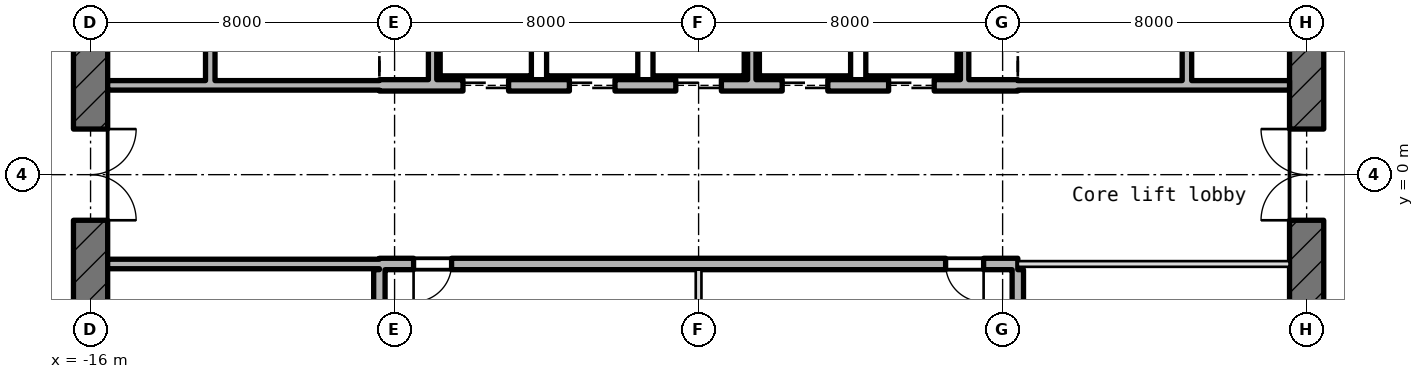
"""IFC4 building model, lengths in metres.
Left out: names, types, materials, properties, quantities, classifications, styles, units other than length and angle.
Written with IfcOpenShell. Run it as: python <this file> out.ifc"""

import sys

from ifc_helpers import new_model, si_unit, direction, frame, frame_2d, origin, place, context, subcontext, project, spatial, rectangle, extrude, element, fill, save


model = new_model("IFC4")
c1 = context("Model", 3, precision=1e-05, world=origin(), true_north=direction((0.0, 1.0)))
c2 = subcontext(c1, "Body", "Model", "MODEL_VIEW")
j1 = project(units=[si_unit("LENGTHUNIT", "METRE"), si_unit("PLANEANGLEUNIT", "RADIAN")], contexts=[c1])
p1 = place(None, origin())
s1 = spatial("IfcSite", under=j1, at=p1, CompositionType="ELEMENT")
p2 = place(p1, origin())
s2 = spatial("IfcBuilding", under=s1, at=p2, CompositionType="ELEMENT")
p3 = place(p2, frame((0.0, 0.0, 198.4)))
s3 = spatial("IfcBuildingStorey", under=s2, at=p3, CompositionType="ELEMENT", Elevation=198.4)
p4 = place(p3, frame((16.0, -10.186, -0.18), z_axis=(0.0, 0.0, 1.0), x_axis=(0.0, 1.0, 0.0)))
e1 = element("IfcWall", 1, at=p4, inside=s3, PredefinedType="SHEAR", context=c2, shape_type="SweptSolid", body=[
    extrude(rectangle(XDim=20.373, YDim=0.9, at=frame_2d((10.186, 0.0))), origin(), (0.0, 0.0, 1.0), 4.15),
])
p5 = place(p4, frame((8.986, 0.0, 0.18)))
e2 = element("IfcOpeningElement", 2, at=p5, cuts=e1, PredefinedType="OPENING", context=c2, shape_type="SweptSolid", body=[
    extrude(rectangle(XDim=2.4, YDim=2.1, at=frame_2d((1.2, 1.05))), frame((0.0, 0.46, 0.0), z_axis=(0.0, -1.0, 0.0), x_axis=(1.0, 0.0, 0.0)), (0.0, 0.0, 1.0), 0.92),
])
p6 = place(p4, frame((13.586, 0.0, 0.18)))
e3 = element("IfcOpeningElement", 3, at=p6, cuts=e1, PredefinedType="OPENING", context=c2, shape_type="SweptSolid", body=[
    extrude(rectangle(XDim=1.2, YDim=2.1, at=frame_2d((0.6, 1.05))), frame((0.0, 0.46, 0.0), z_axis=(0.0, -1.0, 0.0), x_axis=(1.0, 0.0, 0.0)), (0.0, 0.0, 1.0), 0.92),
])
p7 = place(p4, frame((3.586, 0.0, 0.18)))
e4 = element("IfcOpeningElement", 4, at=p7, cuts=e1, PredefinedType="OPENING", context=c2, shape_type="SweptSolid", body=[
    extrude(rectangle(XDim=1.2, YDim=2.1, at=frame_2d((0.6, 1.05))), frame((0.0, 0.46, 0.0), z_axis=(0.0, -1.0, 0.0), x_axis=(1.0, 0.0, 0.0)), (0.0, 0.0, 1.0), 0.92),
])
p8 = place(p3, frame((-16.0, 10.186, -0.18), z_axis=(0.0, 0.0, 1.0), x_axis=(0.0, -1.0, 0.0)))
e5 = element("IfcWall", 5, at=p8, inside=s3, PredefinedType="SHEAR", context=c2, shape_type="SweptSolid", body=[
    extrude(rectangle(XDim=20.373, YDim=0.9, at=frame_2d((10.186, 0.0))), origin(), (0.0, 0.0, 1.0), 4.15),
])
p9 = place(p8, frame((8.986, 0.0, 0.18)))
e6 = element("IfcOpeningElement", 6, at=p9, cuts=e5, PredefinedType="OPENING", context=c2, shape_type="SweptSolid", body=[
    extrude(rectangle(XDim=2.4, YDim=2.1, at=frame_2d((1.2, 1.05))), frame((0.0, 0.46, 0.0), z_axis=(0.0, -1.0, 0.0), x_axis=(1.0, 0.0, 0.0)), (0.0, 0.0, 1.0), 0.92),
])
p10 = place(p8, frame((5.586, 0.0, 0.18)))
e7 = element("IfcOpeningElement", 7, at=p10, cuts=e5, PredefinedType="OPENING", context=c2, shape_type="SweptSolid", body=[
    extrude(rectangle(XDim=1.2, YDim=2.1, at=frame_2d((0.6, 1.05))), frame((0.0, 0.46, 0.0), z_axis=(0.0, -1.0, 0.0), x_axis=(1.0, 0.0, 0.0)), (0.0, 0.0, 1.0), 0.92),
])
p11 = place(p3, frame((-15.55, -2.35, 0.0), z_axis=(0.0, 0.0, 1.0), x_axis=(1.0, 0.0, 0.0)))
e8 = element("IfcWall", 8, at=p11, inside=s3, PredefinedType="STANDARD", context=c2, shape_type="SweptSolid", body=[
    extrude(rectangle(XDim=7.15, YDim=0.25, at=frame_2d((3.575, 0.0))), origin(), (0.0, 0.0, 1.0), 3.97),
])
p12 = place(p3, frame((-8.4, -2.35, -0.18), z_axis=(0.0, 0.0, 1.0), x_axis=(1.0, 0.0, 0.0)))
e9 = element("IfcWall", 9, at=p12, inside=s3, PredefinedType="SHEAR", context=c2, shape_type="SweptSolid", body=[
    extrude(rectangle(XDim=16.8, YDim=0.3, at=frame_2d((8.4, 0.0))), origin(), (0.0, 0.0, 1.0), 4.15),
])
p13 = place(p12, frame((0.9, 0.0, 0.18)))
e10 = element("IfcOpeningElement", 10, at=p13, cuts=e9, PredefinedType="OPENING", context=c2, shape_type="SweptSolid", body=[
    extrude(rectangle(XDim=1.0, YDim=2.1, at=frame_2d((0.5, 1.05))), frame((0.0, 0.16, 0.0), z_axis=(0.0, -1.0, 0.0), x_axis=(1.0, 0.0, 0.0)), (0.0, 0.0, 1.0), 0.32),
])
p14 = place(p12, frame((14.9, 0.0, 0.18)))
e11 = element("IfcOpeningElement", 11, at=p14, cuts=e9, PredefinedType="OPENING", context=c2, shape_type="SweptSolid", body=[
    extrude(rectangle(XDim=1.0, YDim=2.1, at=frame_2d((0.5, 1.05))), frame((0.0, 0.16, 0.0), z_axis=(0.0, -1.0, 0.0), x_axis=(1.0, 0.0, 0.0)), (0.0, 0.0, 1.0), 0.32),
])
p15 = place(p3, frame((8.4, -2.35, 0.0), z_axis=(0.0, 0.0, 1.0), x_axis=(1.0, 0.0, 0.0)))
e12 = element("IfcWall", 12, at=p15, inside=s3, PredefinedType="PARTITIONING", context=c2, shape_type="SweptSolid", body=[
    extrude(rectangle(XDim=7.15, YDim=0.15, at=frame_2d((3.575, 0.0))), origin(), (0.0, 0.0, 1.0), 3.97),
])
p16 = place(p3, frame((-15.55, 2.35, 0.0), z_axis=(0.0, 0.0, 1.0), x_axis=(1.0, 0.0, 0.0)))
e13 = element("IfcWall", 13, at=p16, inside=s3, PredefinedType="STANDARD", context=c2, shape_type="SweptSolid", body=[
    extrude(rectangle(XDim=7.15, YDim=0.25, at=frame_2d((3.575, 0.0))), origin(), (0.0, 0.0, 1.0), 3.97),
])
p17 = place(p3, frame((-8.4, 2.35, -0.18), z_axis=(0.0, 0.0, 1.0), x_axis=(1.0, 0.0, 0.0)))
e14 = element("IfcWall", 14, at=p17, inside=s3, PredefinedType="SHEAR", context=c2, shape_type="SweptSolid", body=[
    extrude(rectangle(XDim=16.8, YDim=0.3, at=frame_2d((8.4, 0.0))), origin(), (0.0, 0.0, 1.0), 4.15),
])
p18 = place(p17, frame((2.2, 0.0, 0.18)))
e15 = element("IfcOpeningElement", 15, at=p18, cuts=e14, PredefinedType="OPENING", context=c2, shape_type="SweptSolid", body=[
    extrude(rectangle(XDim=1.2, YDim=2.1, at=frame_2d((0.6, 1.05))), frame((0.0, 0.16, 0.0), z_axis=(0.0, -1.0, 0.0), x_axis=(1.0, 0.0, 0.0)), (0.0, 0.0, 1.0), 0.32),
])
p19 = place(p17, frame((5.0, 0.0, 0.18)))
e16 = element("IfcOpeningElement", 16, at=p19, cuts=e14, PredefinedType="OPENING", context=c2, shape_type="SweptSolid", body=[
    extrude(rectangle(XDim=1.2, YDim=2.1, at=frame_2d((0.6, 1.05))), frame((0.0, 0.16, 0.0), z_axis=(0.0, -1.0, 0.0), x_axis=(1.0, 0.0, 0.0)), (0.0, 0.0, 1.0), 0.32),
])
p20 = place(p17, frame((7.8, 0.0, 0.18)))
e17 = element("IfcOpeningElement", 17, at=p20, cuts=e14, PredefinedType="OPENING", context=c2, shape_type="SweptSolid", body=[
    extrude(rectangle(XDim=1.2, YDim=2.1, at=frame_2d((0.6, 1.05))), frame((0.0, 0.16, 0.0), z_axis=(0.0, -1.0, 0.0), x_axis=(1.0, 0.0, 0.0)), (0.0, 0.0, 1.0), 0.32),
])
p21 = place(p17, frame((10.6, 0.0, 0.18)))
e18 = element("IfcOpeningElement", 18, at=p21, cuts=e14, PredefinedType="OPENING", context=c2, shape_type="SweptSolid", body=[
    extrude(rectangle(XDim=1.2, YDim=2.1, at=frame_2d((0.6, 1.05))), frame((0.0, 0.16, 0.0), z_axis=(0.0, -1.0, 0.0), x_axis=(1.0, 0.0, 0.0)), (0.0, 0.0, 1.0), 0.32),
])
p22 = place(p17, frame((13.4, 0.0, 0.18)))
e19 = element("IfcOpeningElement", 19, at=p22, cuts=e14, PredefinedType="OPENING", context=c2, shape_type="SweptSolid", body=[
    extrude(rectangle(XDim=1.2, YDim=2.1, at=frame_2d((0.6, 1.05))), frame((0.0, 0.16, 0.0), z_axis=(0.0, -1.0, 0.0), x_axis=(1.0, 0.0, 0.0)), (0.0, 0.0, 1.0), 0.32),
])
p23 = place(p3, frame((8.4, 2.35, 0.0), z_axis=(0.0, 0.0, 1.0), x_axis=(1.0, 0.0, 0.0)))
e20 = element("IfcWall", 20, at=p23, inside=s3, PredefinedType="STANDARD", context=c2, shape_type="SweptSolid", body=[
    extrude(rectangle(XDim=7.15, YDim=0.25, at=frame_2d((3.575, 0.0))), origin(), (0.0, 0.0, 1.0), 3.97),
])
p24 = place(p3, frame((-12.85, 2.475, 0.0), z_axis=(0.0, 0.0, 1.0), x_axis=(0.0, 1.0, 0.0)))
e21 = element("IfcWall", 21, at=p24, inside=s3, PredefinedType="STANDARD", context=c2, shape_type="SweptSolid", body=[
    extrude(rectangle(XDim=3.05, YDim=0.25, at=frame_2d((1.525, 0.0))), origin(), (0.0, 0.0, 1.0), 3.97),
])
p25 = place(p3, frame((-8.4, -8.75, -0.18), z_axis=(0.0, 0.0, 1.0), x_axis=(0.0, 1.0, 0.0)))
e22 = element("IfcWall", 22, at=p25, inside=s3, PredefinedType="SHEAR", context=c2, shape_type="SweptSolid", body=[
    extrude(rectangle(XDim=6.25, YDim=0.3, at=frame_2d((3.125, 0.0))), origin(), (0.0, 0.0, 1.0), 4.15),
])
p26 = place(p3, frame((-7.0, 2.5, 0.0), z_axis=(0.0, 0.0, 1.0), x_axis=(0.0, 1.0, 0.0)))
e23 = element("IfcWall", 23, at=p26, inside=s3, PredefinedType="STANDARD", context=c2, shape_type="SweptSolid", body=[
    extrude(rectangle(XDim=2.74, YDim=0.22, at=frame_2d((1.37, 0.0))), origin(), (0.0, 0.0, 1.0), 3.97),
])
p27 = place(p3, frame((0.0, -5.24, 0.0), z_axis=(0.0, 0.0, 1.0), x_axis=(0.0, 1.0, 0.0)))
e24 = element("IfcWall", 24, at=p27, inside=s3, PredefinedType="PARTITIONING", context=c2, shape_type="SweptSolid", body=[
    extrude(rectangle(XDim=2.74, YDim=0.15, at=frame_2d((1.37, 0.0))), origin(), (0.0, 0.0, 1.0), 3.97),
])
for number, where, z_axis, x_axis in (
    (25, (1.4, 2.5, 0.0), (0.0, 0.0, 1.0), (0.0, 1.0, 0.0)),
    (26, (7.0, 2.5, 0.0), (0.0, 0.0, 1.0), (0.0, 1.0, 0.0)),
):
    element("IfcWall", number, at=place(p3, frame(where, z_axis=z_axis, x_axis=x_axis)), inside=s3, PredefinedType="STANDARD", context=c2, shape_type="SweptSolid", body=[
        extrude(rectangle(XDim=2.74, YDim=0.22, at=frame_2d((1.37, 0.0))), origin(), (0.0, 0.0, 1.0), 3.97),
    ])
p28 = place(p3, frame((8.4, -8.35, -0.18), z_axis=(0.0, 0.0, 1.0), x_axis=(0.0, 1.0, 0.0)))
e27 = element("IfcWall", 27, at=p28, inside=s3, PredefinedType="SHEAR", context=c2, shape_type="SweptSolid", body=[
    extrude(rectangle(XDim=5.85, YDim=0.3, at=frame_2d((2.925, 0.0))), origin(), (0.0, 0.0, 1.0), 4.15),
])
p29 = place(p3, frame((12.85, 2.475, 0.0), z_axis=(0.0, 0.0, 1.0), x_axis=(0.0, 1.0, 0.0)))
e28 = element("IfcWall", 28, at=p29, inside=s3, PredefinedType="STANDARD", context=c2, shape_type="SweptSolid", body=[
    extrude(rectangle(XDim=3.05, YDim=0.25, at=frame_2d((1.525, 0.0))), origin(), (0.0, 0.0, 1.0), 3.97),
])
p30 = place(p18, origin())
e29 = element("IfcDoor", 29, at=p30, inside=s3, OperationType="DOUBLE_DOOR_SLIDING", PredefinedType="DOOR", context=c2, shape_type="SweptSolid", body=[
    extrude(rectangle(XDim=1.2, YDim=2.1, at=frame_2d((0.6, 1.05))), frame((0.0, 0.025, 0.0), z_axis=(0.0, -1.0, 0.0), x_axis=(1.0, 0.0, 0.0)), (0.0, 0.0, 1.0), 0.05),
])
fill(e15, e29)
p31 = place(p19, origin())
e30 = element("IfcDoor", 30, at=p31, inside=s3, OperationType="DOUBLE_DOOR_SLIDING", PredefinedType="DOOR", context=c2, shape_type="SweptSolid", body=[
    extrude(rectangle(XDim=1.2, YDim=2.1, at=frame_2d((0.6, 1.05))), frame((0.0, 0.025, 0.0), z_axis=(0.0, -1.0, 0.0), x_axis=(1.0, 0.0, 0.0)), (0.0, 0.0, 1.0), 0.05),
])
fill(e16, e30)
p32 = place(p20, origin())
e31 = element("IfcDoor", 31, at=p32, inside=s3, OperationType="DOUBLE_DOOR_SLIDING", PredefinedType="DOOR", context=c2, shape_type="SweptSolid", body=[
    extrude(rectangle(XDim=1.2, YDim=2.1, at=frame_2d((0.6, 1.05))), frame((0.0, 0.025, 0.0), z_axis=(0.0, -1.0, 0.0), x_axis=(1.0, 0.0, 0.0)), (0.0, 0.0, 1.0), 0.05),
])
fill(e17, e31)
p33 = place(p21, origin())
e32 = element("IfcDoor", 32, at=p33, inside=s3, OperationType="DOUBLE_DOOR_SLIDING", PredefinedType="DOOR", context=c2, shape_type="SweptSolid", body=[
    extrude(rectangle(XDim=1.2, YDim=2.1, at=frame_2d((0.6, 1.05))), frame((0.0, 0.025, 0.0), z_axis=(0.0, -1.0, 0.0), x_axis=(1.0, 0.0, 0.0)), (0.0, 0.0, 1.0), 0.05),
])
fill(e18, e32)
p34 = place(p22, origin())
e33 = element("IfcDoor", 33, at=p34, inside=s3, OperationType="DOUBLE_DOOR_SLIDING", PredefinedType="DOOR", context=c2, shape_type="SweptSolid", body=[
    extrude(rectangle(XDim=1.2, YDim=2.1, at=frame_2d((0.6, 1.05))), frame((0.0, 0.025, 0.0), z_axis=(0.0, -1.0, 0.0), x_axis=(1.0, 0.0, 0.0)), (0.0, 0.0, 1.0), 0.05),
])
fill(e19, e33)
p35 = place(p9, origin())
e34 = element("IfcDoor", 34, at=p35, inside=s3, OperationType="DOUBLE_DOOR_SINGLE_SWING", PredefinedType="DOOR", context=c2, shape_type="SweptSolid", body=[
    extrude(rectangle(XDim=2.4, YDim=2.1, at=frame_2d((1.2, 1.05))), frame((0.0, 0.025, 0.0), z_axis=(0.0, -1.0, 0.0), x_axis=(1.0, 0.0, 0.0)), (0.0, 0.0, 1.0), 0.05),
])
fill(e6, e34)
p36 = place(p5, origin())
e35 = element("IfcDoor", 35, at=p36, inside=s3, OperationType="DOUBLE_DOOR_SINGLE_SWING", PredefinedType="DOOR", context=c2, shape_type="SweptSolid", body=[
    extrude(rectangle(XDim=2.4, YDim=2.1, at=frame_2d((1.2, 1.05))), frame((0.0, 0.025, 0.0), z_axis=(0.0, -1.0, 0.0), x_axis=(1.0, 0.0, 0.0)), (0.0, 0.0, 1.0), 0.05),
])
fill(e2, e35)
p37 = place(p13, frame((1.0, 0.0, 0.0), z_axis=(0.0, 0.0, 1.0), x_axis=(-1.0, 0.0, 0.0)))
e36 = element("IfcDoor", 36, at=p37, inside=s3, OperationType="SINGLE_SWING_LEFT", PredefinedType="DOOR", context=c2, shape_type="SweptSolid", body=[
    extrude(rectangle(XDim=1.0, YDim=2.1, at=frame_2d((0.5, 1.05))), frame((0.0, 0.025, 0.0), z_axis=(0.0, -1.0, 0.0), x_axis=(1.0, 0.0, 0.0)), (0.0, 0.0, 1.0), 0.05),
])
fill(e10, e36)
p38 = place(p14, frame((1.0, 0.0, 0.0), z_axis=(0.0, 0.0, 1.0), x_axis=(-1.0, 0.0, 0.0)))
e37 = element("IfcDoor", 37, at=p38, inside=s3, OperationType="SINGLE_SWING_LEFT", PredefinedType="DOOR", context=c2, shape_type="SweptSolid", body=[
    extrude(rectangle(XDim=1.0, YDim=2.1, at=frame_2d((0.5, 1.05))), frame((0.0, 0.025, 0.0), z_axis=(0.0, -1.0, 0.0), x_axis=(1.0, 0.0, 0.0)), (0.0, 0.0, 1.0), 0.05),
])
fill(e11, e37)
save(model, sys.argv[1])
